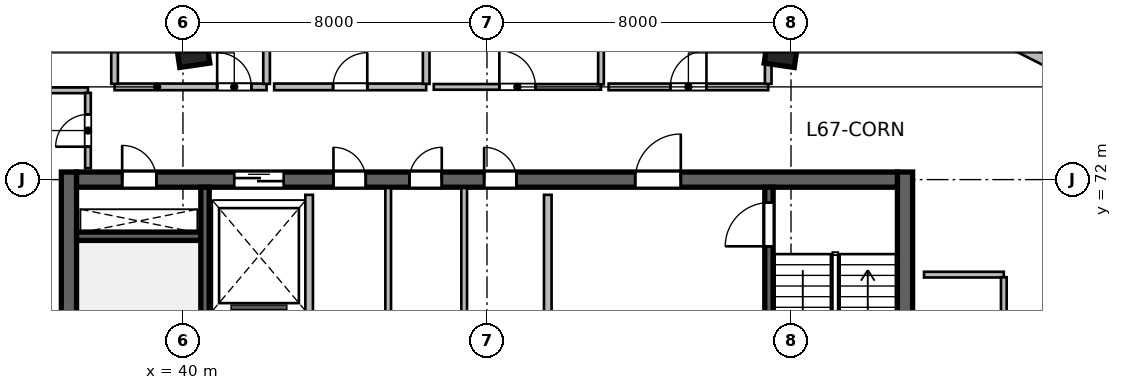
"""IFC4 building model, lengths in metres.
Left out: names, types, materials, properties, quantities, classifications, styles, units other than length and angle.
Written with IfcOpenShell. Run it as: python <this file> out.ifc"""

import sys

from ifc_helpers import new_model, si_unit, direction, frame, frame_2d, origin, origin_2d, place, context, subcontext, project, spatial, rectangle, extrude, source, transform, mapped, element, fill, save


model = new_model("IFC4")
c1 = context("Model", 3, precision=1e-05, world=origin(), true_north=direction((0.0, 1.0)))
c2 = subcontext(c1, "Body", "Model", "MODEL_VIEW")
j1 = project(units=[si_unit("LENGTHUNIT", "METRE"), si_unit("PLANEANGLEUNIT", "RADIAN")], contexts=[c1])
p1 = place(None, origin())
s1 = spatial("IfcSite", under=j1, at=p1, CompositionType="ELEMENT")
p2 = place(p1, origin())
s2 = spatial("IfcBuilding", under=s1, at=p2, CompositionType="ELEMENT")
p3 = place(p2, frame((0.0, 0.0, 275.7)))
s3 = spatial("IfcBuildingStorey", under=s2, at=p3, CompositionType="ELEMENT", Elevation=275.7)
m1 = source(origin(), c2, "Body", "SweptSolid", [
    extrude(rectangle(XDim=12.0, YDim=0.4, at=frame_2d((6.0, 0.0))), origin(), (0.0, 0.0, 1.0), 3.9),
])
for number, where, z_axis, x_axis in (
    (1, (37.0, 60.2, 0.0), (0.0, 0.0, 1.0), (0.0, 1.0, 0.0)),
    (2, (59.0, 60.2, 0.0), (0.0, 0.0, 1.0), (0.0, 1.0, 0.0)),
):
    element("IfcWall", number, at=place(p3, frame(where, z_axis=z_axis, x_axis=x_axis)), inside=s3, PredefinedType="SHEAR", context=c2, shape_type="MappedRepresentation", body=[
        mapped(m1, transform((0.0, 0.0, 0.0), scale=1.0)),
    ])
m2 = source(origin(), c2, "Body", "SweptSolid", [
    extrude(rectangle(XDim=21.6, YDim=0.4, at=frame_2d((10.8, 0.0))), origin(), (0.0, 0.0, 1.0), 3.9),
])
p4 = place(p3, frame((37.2, 72.0, 0.0), z_axis=(0.0, 0.0, 1.0), x_axis=(1.0, 0.0, 0.0)))
e3 = element("IfcWall", 3, at=p4, inside=s3, PredefinedType="SHEAR", context=c2, shape_type="MappedRepresentation", body=[
    mapped(m2, transform((0.0, 0.0, 0.0), scale=1.0)),
])
p5 = place(p4, frame((1.2, 0.0, 0.0)))
e4 = element("IfcOpeningElement", 4, at=p5, cuts=e3, PredefinedType="OPENING", context=c2, shape_type="SweptSolid", body=[
    extrude(rectangle(XDim=0.9, YDim=2.1, at=frame_2d((0.45, 1.05))), frame((0.0, 0.21, 0.0), z_axis=(0.0, -1.0, 0.0), x_axis=(1.0, 0.0, 0.0)), (0.0, 0.0, 1.0), 0.42),
])
p6 = place(p4, frame((14.7, 0.0, 0.0)))
e5 = element("IfcOpeningElement", 5, at=p6, cuts=e3, PredefinedType="OPENING", context=c2, shape_type="SweptSolid", body=[
    extrude(rectangle(XDim=1.2, YDim=2.15, at=frame_2d((0.6, 1.075))), frame((0.0, 0.21, 0.0), z_axis=(0.0, -1.0, 0.0), x_axis=(1.0, 0.0, 0.0)), (0.0, 0.0, 1.0), 0.42),
])
p7 = place(p4, frame((4.15, 0.0, 0.0)))
e6 = element("IfcOpeningElement", 6, at=p7, cuts=e3, PredefinedType="OPENING", context=c2, shape_type="SweptSolid", body=[
    extrude(rectangle(XDim=1.3, YDim=2.15, at=frame_2d((0.65, 1.075))), frame((0.0, 0.21, 0.0), z_axis=(0.0, -1.0, 0.0), x_axis=(1.0, 0.0, 0.0)), (0.0, 0.0, 1.0), 0.42),
])
p8 = place(p4, frame((6.76, 0.0, 0.0)))
e7 = element("IfcOpeningElement", 7, at=p8, cuts=e3, PredefinedType="OPENING", context=c2, shape_type="SweptSolid", body=[
    extrude(rectangle(XDim=0.85, YDim=2.1, at=frame_2d((0.425, 1.05))), frame((0.0, 0.21, 0.0), z_axis=(0.0, -1.0, 0.0), x_axis=(1.0, 0.0, 0.0)), (0.0, 0.0, 1.0), 0.42),
])
p9 = place(p4, frame((8.76, 0.0, 0.0)))
e8 = element("IfcOpeningElement", 8, at=p9, cuts=e3, PredefinedType="OPENING", context=c2, shape_type="SweptSolid", body=[
    extrude(rectangle(XDim=0.85, YDim=2.1, at=frame_2d((0.425, 1.05))), frame((0.0, 0.21, 0.0), z_axis=(0.0, -1.0, 0.0), x_axis=(1.0, 0.0, 0.0)), (0.0, 0.0, 1.0), 0.42),
])
p10 = place(p4, frame((10.725, 0.0, 0.0)))
e9 = element("IfcOpeningElement", 9, at=p10, cuts=e3, PredefinedType="OPENING", context=c2, shape_type="SweptSolid", body=[
    extrude(rectangle(XDim=0.85, YDim=2.1, at=frame_2d((0.425, 1.05))), frame((0.0, 0.21, 0.0), z_axis=(0.0, -1.0, 0.0), x_axis=(1.0, 0.0, 0.0)), (0.0, 0.0, 1.0), 0.42),
])
m3 = source(origin(), c2, "Body", "SweptSolid", [
    extrude(rectangle(XDim=3.27, YDim=0.22, at=frame_2d((1.635, 0.0))), origin(), (0.0, 0.0, 1.0), 3.9),
])
p11 = place(p3, frame((37.2, 70.51, 0.0), z_axis=(0.0, 0.0, 1.0), x_axis=(1.0, 0.0, 0.0)))
e10 = element("IfcWall", 10, at=p11, inside=s3, PredefinedType="SHEAR", context=c2, shape_type="MappedRepresentation", body=[
    mapped(m3, transform((0.0, 0.0, 0.0), scale=1.0)),
])
m4 = source(origin(), c2, "Body", "SweptSolid", [
    extrude(rectangle(XDim=11.2, YDim=0.22, at=frame_2d((5.6, 0.0))), origin(), (0.0, 0.0, 1.0), 3.9),
])
p12 = place(p3, frame((40.58, 60.6, 0.0), z_axis=(0.0, 0.0, 1.0), x_axis=(0.0, 1.0, 0.0)))
e11 = element("IfcWall", 11, at=p12, inside=s3, PredefinedType="SHEAR", context=c2, shape_type="MappedRepresentation", body=[
    mapped(m4, transform((0.0, 0.0, 0.0), scale=1.0)),
])
p13 = place(p3, frame((55.42, 60.6, 0.0), z_axis=(0.0, 0.0, 1.0), x_axis=(0.0, 1.0, 0.0)))
e12 = element("IfcWall", 12, at=p13, inside=s3, PredefinedType="SHEAR", context=c2, shape_type="MappedRepresentation", body=[
    mapped(m4, transform((0.0, 0.0, 0.0), scale=1.0)),
])
p14 = place(p13, frame((9.645, 0.0, 0.0)))
e13 = element("IfcOpeningElement", 13, at=p14, cuts=e12, PredefinedType="OPENING", context=c2, shape_type="SweptSolid", body=[
    extrude(rectangle(XDim=1.15, YDim=2.15, at=frame_2d((0.575, 1.075))), frame((0.0, 0.12, 0.0), z_axis=(0.0, -1.0, 0.0), x_axis=(1.0, 0.0, 0.0)), (0.0, 0.0, 1.0), 0.24),
])
m5 = source(origin(), c2, "Body", "SweptSolid", [
    extrude(rectangle(XDim=0.8, YDim=0.8, at=origin_2d()), origin(), (0.0, 0.0, 1.0), 3.9),
])
for number, where, z_axis, x_axis in (
    (14, (40.253, 75.404, 0.0), (0.0, 0.0, 1.0), (-0.143, 0.99, 0.0)),
    (15, (55.747, 75.404, 0.0), (0.0, 0.0, 1.0), (0.143, 0.99, 0.0)),
):
    element("IfcColumn", number, at=place(p3, frame(where, z_axis=z_axis, x_axis=x_axis)), inside=s3, PredefinedType="COLUMN", context=c2, shape_type="MappedRepresentation", body=[
        mapped(m5, transform((0.0, 0.0, 0.0), scale=1.0)),
    ])
m6 = source(origin(), c2, "Body", "SweptSolid", [
    extrude(rectangle(XDim=2.706, YDim=0.28, at=frame_2d((1.353, 0.0))), origin(), (0.0, 0.0, 1.0), 3.64),
])
p15 = place(p3, frame((61.745, 75.62, 0.0), z_axis=(0.0, 0.0, 1.0), x_axis=(0.891648836287, -0.452727680564, 0.0)))
e16 = element("IfcWall", 16, at=p15, inside=s3, PredefinedType="SOLIDWALL", context=c2, shape_type="MappedRepresentation", body=[
    mapped(m6, transform((0.0, 0.0, 0.0), scale=1.0)),
])
m7 = source(origin(), c2, "Body", "SweptSolid", [
    extrude(rectangle(XDim=5.8, YDim=0.2, at=frame_2d((2.9, 0.0))), origin(), (0.0, 0.0, 1.0), 3.64),
])
p16 = place(p3, frame((49.6, 65.8, 0.0), z_axis=(0.0, 0.0, 1.0), x_axis=(0.0, 1.0, 0.0)))
e17 = element("IfcWall", 17, at=p16, inside=s3, PredefinedType="SOLIDWALL", context=c2, shape_type="MappedRepresentation", body=[
    mapped(m7, transform((0.0, 0.0, 0.0), scale=1.0)),
])
m8 = source(origin(), c2, "Body", "SweptSolid", [
    extrude(rectangle(XDim=3.2, YDim=0.2, at=frame_2d((1.6, 0.0))), origin(), (0.0, 0.0, 1.0), 3.64),
])
p17 = place(p3, frame((43.32, 68.4, 0.0), z_axis=(0.0, 0.0, 1.0), x_axis=(0.0, 1.0, 0.0)))
e18 = element("IfcWall", 18, at=p17, inside=s3, PredefinedType="SOLIDWALL", context=c2, shape_type="MappedRepresentation", body=[
    mapped(m8, transform((0.0, 0.0, 0.0), scale=1.0)),
])
m9 = source(origin(), c2, "Body", "SweptSolid", [
    extrude(rectangle(XDim=3.38, YDim=0.15, at=frame_2d((1.69, 0.0))), origin(), (0.0, 0.0, 1.0), 3.64),
])
for number, where, z_axis, x_axis in (
    (19, (45.4, 68.4, 0.0), (0.0, 0.0, 1.0), (0.0, 1.0, 0.0)),
    (20, (47.4, 68.4, 0.0), (0.0, 0.0, 1.0), (0.0, 1.0, 0.0)),
):
    element("IfcWall", number, at=place(p3, frame(where, z_axis=z_axis, x_axis=x_axis)), inside=s3, PredefinedType="PARTITIONING", context=c2, shape_type="MappedRepresentation", body=[
        mapped(m9, transform((0.0, 0.0, 0.0), scale=1.0)),
    ])
m10 = source(origin(), c2, "Body", "SweptSolid", [
    extrude(rectangle(XDim=3.1, YDim=0.15, at=frame_2d((1.55, 0.0))), origin(), (0.0, 0.0, 1.0), 3.071),
])
p18 = place(p3, frame((34.4, 74.35, 0.0), z_axis=(0.0, 0.0, 1.0), x_axis=(1.0, 0.0, 0.0)))
e21 = element("IfcWall", 21, at=p18, inside=s3, PredefinedType="PARTITIONING", context=c2, shape_type="MappedRepresentation", body=[
    mapped(m10, transform((0.0, 0.0, 0.0), scale=1.0)),
])
m11 = source(origin(), c2, "Body", "SweptSolid", [
    extrude(rectangle(XDim=1.982, YDim=0.15, at=frame_2d((0.991, 0.0))), origin(), (0.0, 0.0, 1.0), 3.64),
])
p19 = place(p3, frame((37.5, 72.3, 0.0), z_axis=(0.0, 0.0, 1.0), x_axis=(0.0, 1.0, 0.0)))
e22 = element("IfcWall", 22, at=p19, inside=s3, PredefinedType="PARTITIONING", context=c2, shape_type="MappedRepresentation", body=[
    mapped(m11, transform((0.0, 0.0, 0.0), scale=1.0)),
])
p20 = place(p19, frame((0.566, 0.0, 0.0)))
e23 = element("IfcOpeningElement", 23, at=p20, cuts=e22, PredefinedType="OPENING", context=c2, shape_type="SweptSolid", body=[
    extrude(rectangle(XDim=0.85, YDim=2.1, at=frame_2d((0.425, 1.05))), frame((0.0, 0.085, 0.0), z_axis=(0.0, -1.0, 0.0), x_axis=(1.0, 0.0, 0.0)), (0.0, 0.0, 1.0), 0.17),
])
m12 = source(origin(), c2, "Body", "SweptSolid", [
    extrude(rectangle(XDim=2.1, YDim=0.15, at=frame_2d((1.05, 0.0))), origin(), (0.0, 0.0, 1.0), 3.64),
])
p21 = place(p3, frame((59.5, 69.5, 0.0), z_axis=(0.0, 0.0, 1.0), x_axis=(1.0, 0.0, 0.0)))
e24 = element("IfcWall", 24, at=p21, inside=s3, PredefinedType="PARTITIONING", context=c2, shape_type="MappedRepresentation", body=[
    mapped(m12, transform((0.0, 0.0, 0.0), scale=1.0)),
])
m13 = source(origin(), c2, "Body", "SweptSolid", [
    extrude(rectangle(XDim=3.565, YDim=0.15, at=frame_2d((1.783, 0.0))), origin(), (0.0, 0.0, 1.0), 3.64),
])
p22 = place(p3, frame((61.6, 65.867, 0.0), z_axis=(0.0, 0.0, 1.0), x_axis=(0.0, 1.0, 0.0)))
e25 = element("IfcWall", 25, at=p22, inside=s3, PredefinedType="PARTITIONING", context=c2, shape_type="MappedRepresentation", body=[
    mapped(m13, transform((0.0, 0.0, 0.0), scale=1.0)),
])
p23 = place(p22, frame((0.88, 0.0, 0.0)))
e26 = element("IfcOpeningElement", 26, at=p23, cuts=e25, PredefinedType="OPENING", context=c2, shape_type="SweptSolid", body=[
    extrude(rectangle(XDim=0.95, YDim=2.1, at=frame_2d((0.475, 1.05))), frame((0.0, 0.085, 0.0), z_axis=(0.0, -1.0, 0.0), x_axis=(1.0, 0.0, 0.0)), (0.0, 0.0, 1.0), 0.17),
])
m14 = source(origin(), c2, "Body", "SweptSolid", [
    extrude(rectangle(XDim=4.0, YDim=0.175, at=frame_2d((2.0, 0.0))), origin(), (0.0, 0.0, 1.0), 3.64),
])
p24 = place(p3, frame((38.2, 74.44, 0.0), z_axis=(0.0, 0.0, 1.0), x_axis=(1.0, 0.0, 0.0)))
e27 = element("IfcWall", 27, at=p24, inside=s3, PredefinedType="PARTITIONING", context=c2, shape_type="MappedRepresentation", body=[
    mapped(m14, transform((0.0, 0.0, 0.0), scale=1.0)),
])
p25 = place(p24, frame((2.7, 0.0, 0.0)))
e28 = element("IfcOpeningElement", 28, at=p25, cuts=e27, PredefinedType="OPENING", context=c2, shape_type="SweptSolid", body=[
    extrude(rectangle(XDim=0.9, YDim=2.08, at=frame_2d((0.45, 1.04))), frame((0.0, 0.098, 0.0), z_axis=(0.0, -1.0, 0.0), x_axis=(1.0, 0.0, 0.0)), (0.0, 0.0, 1.0), 0.195),
])
m15 = source(origin(), c2, "Body", "SweptSolid", [
    extrude(rectangle(XDim=2.403, YDim=0.175, at=frame_2d((1.201, 0.0))), origin(), (0.0, 0.0, 1.0), 3.64),
])
for number, where, z_axis, x_axis in (
    (29, (38.2, 74.519, 0.0), (0.0, 0.0, 1.0), (0.0, 1.0, 0.0)),
    (30, (42.2, 74.519, 0.0), (0.0, 0.0, 1.0), (0.0, 1.0, 0.0)),
):
    element("IfcWall", number, at=place(p3, frame(where, z_axis=z_axis, x_axis=x_axis)), inside=s3, PredefinedType="PARTITIONING", context=c2, shape_type="MappedRepresentation", body=[
        mapped(m15, transform((0.0, 0.0, 0.0), scale=1.0)),
    ])
p26 = place(p3, frame((42.4, 74.44, 0.0), z_axis=(0.0, 0.0, 1.0), x_axis=(1.0, 0.0, 0.0)))
e31 = element("IfcWall", 31, at=p26, inside=s3, PredefinedType="PARTITIONING", context=c2, shape_type="MappedRepresentation", body=[
    mapped(m14, transform((0.0, 0.0, 0.0), scale=1.0)),
])
p27 = place(p26, frame((1.55, 0.0, 0.0)))
e32 = element("IfcOpeningElement", 32, at=p27, cuts=e31, PredefinedType="OPENING", context=c2, shape_type="SweptSolid", body=[
    extrude(rectangle(XDim=0.9, YDim=2.08, at=frame_2d((0.45, 1.04))), frame((0.0, 0.098, 0.0), z_axis=(0.0, -1.0, 0.0), x_axis=(1.0, 0.0, 0.0)), (0.0, 0.0, 1.0), 0.195),
])
p28 = place(p3, frame((46.4, 74.519, 0.0), z_axis=(0.0, 0.0, 1.0), x_axis=(0.0, 1.0, 0.0)))
e33 = element("IfcWall", 33, at=p28, inside=s3, PredefinedType="PARTITIONING", context=c2, shape_type="MappedRepresentation", body=[
    mapped(m15, transform((0.0, 0.0, 0.0), scale=1.0)),
])
m16 = source(origin(), c2, "Body", "SweptSolid", [
    extrude(rectangle(XDim=4.4, YDim=0.15, at=frame_2d((2.2, 0.0))), origin(), (0.0, 0.0, 1.0), 3.64),
])
p29 = place(p3, frame((46.6, 74.44, 0.0), z_axis=(0.0, 0.0, 1.0), x_axis=(1.0, 0.0, 0.0)))
e34 = element("IfcWall", 34, at=p29, inside=s3, PredefinedType="PARTITIONING", context=c2, shape_type="MappedRepresentation", body=[
    mapped(m16, transform((0.0, 0.0, 0.0), scale=1.0)),
])
p30 = place(p29, frame((1.725, 0.0, 0.0)))
e35 = element("IfcOpeningElement", 35, at=p30, cuts=e34, PredefinedType="OPENING", context=c2, shape_type="SweptSolid", body=[
    extrude(rectangle(XDim=0.95, YDim=2.1, at=frame_2d((0.475, 1.05))), frame((0.0, 0.085, 0.0), z_axis=(0.0, -1.0, 0.0), x_axis=(1.0, 0.0, 0.0)), (0.0, 0.0, 1.0), 0.17),
])
m17 = source(origin(), c2, "Body", "SweptSolid", [
    extrude(rectangle(XDim=2.425, YDim=0.15, at=frame_2d((1.212, 0.0))), origin(), (0.0, 0.0, 1.0), 3.64),
])
p31 = place(p3, frame((51.0, 74.508, 0.0), z_axis=(0.0, 0.0, 1.0), x_axis=(0.0, 1.0, 0.0)))
e36 = element("IfcWall", 36, at=p31, inside=s3, PredefinedType="PARTITIONING", context=c2, shape_type="MappedRepresentation", body=[
    mapped(m17, transform((0.0, 0.0, 0.0), scale=1.0)),
])
m18 = source(origin(), c2, "Body", "SweptSolid", [
    extrude(rectangle(XDim=4.2, YDim=0.175, at=frame_2d((2.1, 0.0))), origin(), (0.0, 0.0, 1.0), 3.64),
])
p32 = place(p3, frame((51.2, 74.44, 0.0), z_axis=(0.0, 0.0, 1.0), x_axis=(1.0, 0.0, 0.0)))
e37 = element("IfcWall", 37, at=p32, inside=s3, PredefinedType="PARTITIONING", context=c2, shape_type="MappedRepresentation", body=[
    mapped(m18, transform((0.0, 0.0, 0.0), scale=1.0)),
])
p33 = place(p32, frame((1.625, 0.0, 0.0)))
e38 = element("IfcOpeningElement", 38, at=p33, cuts=e37, PredefinedType="OPENING", context=c2, shape_type="SweptSolid", body=[
    extrude(rectangle(XDim=0.95, YDim=2.12, at=frame_2d((0.475, 1.06))), frame((0.0, 0.098, 0.0), z_axis=(0.0, -1.0, 0.0), x_axis=(1.0, 0.0, 0.0)), (0.0, 0.0, 1.0), 0.195),
])
p34 = place(p3, frame((55.4, 74.519, 0.0), z_axis=(0.0, 0.0, 1.0), x_axis=(0.0, 1.0, 0.0)))
e39 = element("IfcWall", 39, at=p34, inside=s3, PredefinedType="PARTITIONING", context=c2, shape_type="MappedRepresentation", body=[
    mapped(m15, transform((0.0, 0.0, 0.0), scale=1.0)),
])
m19 = source(origin(), c2, "Body", "SweptSolid", [
    extrude(rectangle(XDim=12.311, YDim=0.15, at=frame_2d((6.155, 0.0))), origin(), (0.0, 0.0, 1.0), 3.64),
])
p35 = place(p3, frame((36.5, 63.216, 0.0), z_axis=(0.0, 0.0, 1.0), x_axis=(-0.268759602651, 0.963207286093, 0.0)))
e40 = element("IfcWall", 40, at=p35, inside=s3, PredefinedType="PARTITIONING", context=c2, shape_type="MappedRepresentation", body=[
    mapped(m19, transform((0.0, 0.0, 0.0), scale=1.0)),
])
m20 = source(origin(), c2, "Body", "SweptSolid", [
    extrude(rectangle(XDim=0.9, YDim=2.1, at=frame_2d((0.45, 1.05))), frame((0.0, 0.025, 0.0), z_axis=(0.0, -1.0, 0.0), x_axis=(1.0, 0.0, 0.0)), (0.0, 0.0, 1.0), 0.05),
])
p36 = place(p5, origin())
e41 = element("IfcDoor", 41, at=p36, inside=s3, OperationType="SINGLE_SWING_LEFT", PredefinedType="DOOR", context=c2, shape_type="MappedRepresentation", body=[
    mapped(m20, transform((0.0, 0.0, 0.0), scale=1.0)),
])
fill(e4, e41)
m21 = source(origin(), c2, "Body", "SweptSolid", [
    extrude(rectangle(XDim=1.15, YDim=2.15, at=frame_2d((0.575, 1.075))), frame((0.0, 0.025, 0.0), z_axis=(0.0, -1.0, 0.0), x_axis=(1.0, 0.0, 0.0)), (0.0, 0.0, 1.0), 0.05),
])
p37 = place(p14, origin())
e42 = element("IfcDoor", 42, at=p37, inside=s3, OperationType="SINGLE_SWING_LEFT", PredefinedType="DOOR", context=c2, shape_type="MappedRepresentation", body=[
    mapped(m21, transform((0.0, 0.0, 0.0), scale=1.0)),
])
fill(e13, e42)
m22 = source(origin(), c2, "Body", "SweptSolid", [
    extrude(rectangle(XDim=1.2, YDim=2.15, at=frame_2d((0.6, 1.075))), frame((0.0, 0.025, 0.0), z_axis=(0.0, -1.0, 0.0), x_axis=(1.0, 0.0, 0.0)), (0.0, 0.0, 1.0), 0.05),
])
p38 = place(p6, origin())
e43 = element("IfcDoor", 43, at=p38, inside=s3, OperationType="SINGLE_SWING_RIGHT", PredefinedType="DOOR", context=c2, shape_type="MappedRepresentation", body=[
    mapped(m22, transform((0.0, 0.0, 0.0), scale=1.0)),
])
fill(e5, e43)
m23 = source(origin(), c2, "Body", "SweptSolid", [
    extrude(rectangle(XDim=1.3, YDim=2.15, at=frame_2d((0.65, 1.075))), frame((0.0, 0.025, 0.0), z_axis=(0.0, -1.0, 0.0), x_axis=(1.0, 0.0, 0.0)), (0.0, 0.0, 1.0), 0.05),
])
p39 = place(p7, origin())
e44 = element("IfcDoor", 44, at=p39, inside=s3, OperationType="DOUBLE_DOOR_SLIDING", PredefinedType="DOOR", context=c2, shape_type="MappedRepresentation", body=[
    mapped(m23, transform((0.0, 0.0, 0.0), scale=1.0)),
])
fill(e6, e44)
m24 = source(origin(), c2, "Body", "SweptSolid", [
    extrude(rectangle(XDim=0.85, YDim=2.1, at=frame_2d((0.425, 1.05))), frame((0.0, 0.025, 0.0), z_axis=(0.0, -1.0, 0.0), x_axis=(1.0, 0.0, 0.0)), (0.0, 0.0, 1.0), 0.05),
])
p40 = place(p8, origin())
e45 = element("IfcDoor", 45, at=p40, inside=s3, OperationType="SINGLE_SWING_LEFT", PredefinedType="DOOR", context=c2, shape_type="MappedRepresentation", body=[
    mapped(m24, transform((0.0, 0.0, 0.0), scale=1.0)),
])
fill(e7, e45)
p41 = place(p9, origin())
e46 = element("IfcDoor", 46, at=p41, inside=s3, OperationType="SINGLE_SWING_RIGHT", PredefinedType="DOOR", context=c2, shape_type="MappedRepresentation", body=[
    mapped(m24, transform((0.0, 0.0, 0.0), scale=1.0)),
])
fill(e8, e46)
p42 = place(p10, origin())
e47 = element("IfcDoor", 47, at=p42, inside=s3, OperationType="SINGLE_SWING_LEFT", PredefinedType="DOOR", context=c2, shape_type="MappedRepresentation", body=[
    mapped(m24, transform((0.0, 0.0, 0.0), scale=1.0)),
])
fill(e9, e47)
p43 = place(p20, origin())
e48 = element("IfcDoor", 48, at=p43, inside=s3, OperationType="SINGLE_SWING_LEFT", PredefinedType="DOOR", context=c2, shape_type="MappedRepresentation", body=[
    mapped(m24, transform((0.0, 0.0, 0.0), scale=1.0)),
])
fill(e23, e48)
m25 = source(origin(), c2, "Body", "SweptSolid", [
    extrude(rectangle(XDim=0.9, YDim=2.08, at=frame_2d((0.45, 1.04))), frame((0.0, 0.025, 0.0), z_axis=(0.0, -1.0, 0.0), x_axis=(1.0, 0.0, 0.0)), (0.0, 0.0, 1.0), 0.05),
])
p44 = place(p25, origin())
e49 = element("IfcDoor", 49, at=p44, inside=s3, OperationType="SINGLE_SWING_LEFT", PredefinedType="DOOR", context=c2, shape_type="MappedRepresentation", body=[
    mapped(m25, transform((0.0, 0.0, 0.0), scale=1.0)),
])
fill(e28, e49)
p45 = place(p27, origin())
e50 = element("IfcDoor", 50, at=p45, inside=s3, OperationType="SINGLE_SWING_RIGHT", PredefinedType="DOOR", context=c2, shape_type="MappedRepresentation", body=[
    mapped(m25, transform((0.0, 0.0, 0.0), scale=1.0)),
])
fill(e32, e50)
m26 = source(origin(), c2, "Body", "SweptSolid", [
    extrude(rectangle(XDim=0.95, YDim=2.1, at=frame_2d((0.475, 1.05))), frame((0.0, 0.025, 0.0), z_axis=(0.0, -1.0, 0.0), x_axis=(1.0, 0.0, 0.0)), (0.0, 0.0, 1.0), 0.05),
])
p46 = place(p30, origin())
e51 = element("IfcDoor", 51, at=p46, inside=s3, OperationType="SINGLE_SWING_LEFT", PredefinedType="DOOR", context=c2, shape_type="MappedRepresentation", body=[
    mapped(m26, transform((0.0, 0.0, 0.0), scale=1.0)),
])
fill(e35, e51)
m27 = source(origin(), c2, "Body", "SweptSolid", [
    extrude(rectangle(XDim=0.95, YDim=2.12, at=frame_2d((0.475, 1.06))), frame((0.0, 0.025, 0.0), z_axis=(0.0, -1.0, 0.0), x_axis=(1.0, 0.0, 0.0)), (0.0, 0.0, 1.0), 0.05),
])
p47 = place(p33, origin())
e52 = element("IfcDoor", 52, at=p47, inside=s3, OperationType="SINGLE_SWING_RIGHT", PredefinedType="DOOR", context=c2, shape_type="MappedRepresentation", body=[
    mapped(m27, transform((0.0, 0.0, 0.0), scale=1.0)),
])
fill(e38, e52)
save(model, sys.argv[1])
